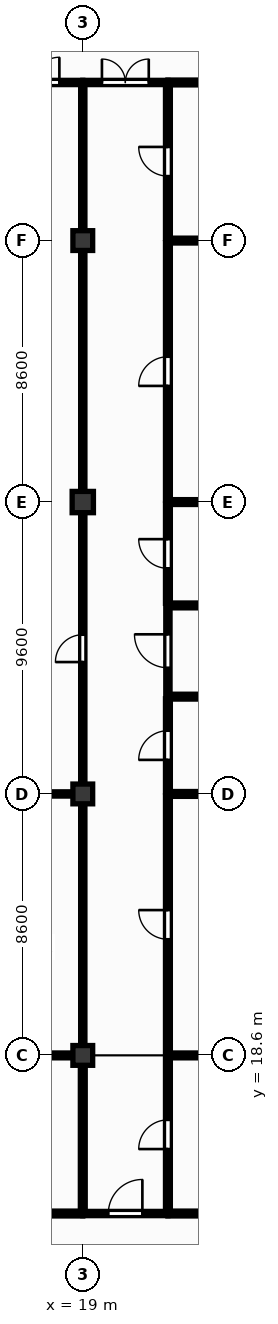
"""IFC4 building model, lengths in metres.
Left out: names, types, materials, properties, quantities, classifications, styles, units other than length and angle.
Written with IfcOpenShell. Run it as: python <this file> out.ifc"""

import sys

from ifc_helpers import new_model, si_unit, direction, frame, frame_2d, origin, origin_2d, place, context, subcontext, project, spatial, rectangle, extrude, element, fill, save


model = new_model("IFC4")
c1 = context("Model", 3, precision=1e-05, world=origin(), true_north=direction((0.0, 1.0)))
c2 = subcontext(c1, "Body", "Model", "MODEL_VIEW")
j1 = project(units=[si_unit("LENGTHUNIT", "METRE"), si_unit("PLANEANGLEUNIT", "RADIAN")], contexts=[c1])
p1 = place(None, origin())
s1 = spatial("IfcSite", under=j1, at=p1, CompositionType="ELEMENT")
p2 = place(p1, origin())
s2 = spatial("IfcBuilding", under=s1, at=p2, CompositionType="ELEMENT")
p3 = place(p2, frame((0.0, 0.0, -4.5)))
s3 = spatial("IfcBuildingStorey", under=s2, at=p3, CompositionType="ELEMENT", Elevation=-4.5)
for number, where, z_axis, x_axis in (
    (1, (19.0, 18.6, 0.0), (0.0, 0.0, 1.0), (1.0, 0.0, 0.0)),
    (2, (19.0, 27.2, 0.0), (0.0, 0.0, 1.0), (1.0, 0.0, 0.0)),
):
    element("IfcColumn", number, at=place(p3, frame(where, z_axis=z_axis, x_axis=x_axis)), inside=s3, PredefinedType="COLUMN", context=c2, shape_type="SweptSolid", body=[
        extrude(rectangle(XDim=0.65, YDim=0.65, at=origin_2d()), origin(), (0.0, 0.0, 1.0), 4.2),
    ])
p4 = place(p3, frame((19.0, 36.8, 0.0), z_axis=(0.0, 0.0, 1.0), x_axis=(1.0, 0.0, 0.0)))
e3 = element("IfcColumn", 3, at=p4, inside=s3, PredefinedType="COLUMN", context=c2, shape_type="SweptSolid", body=[
    extrude(rectangle(XDim=0.7, YDim=0.7, at=origin_2d()), origin(), (0.0, 0.0, 1.0), 4.2),
])
p5 = place(p3, frame((19.0, 45.4, 0.0), z_axis=(0.0, 0.0, 1.0), x_axis=(1.0, 0.0, 0.0)))
e4 = element("IfcColumn", 4, at=p5, inside=s3, PredefinedType="COLUMN", context=c2, shape_type="SweptSolid", body=[
    extrude(rectangle(XDim=0.65, YDim=0.65, at=origin_2d()), origin(), (0.0, 0.0, 1.0), 4.2),
])
p6 = place(p3, frame((14.313, 13.4, 0.0), z_axis=(0.0, 0.0, 1.0), x_axis=(1.0, 0.0, 0.0)))
e5 = element("IfcWall", 5, at=p6, inside=s3, PredefinedType="PARTITIONING", context=c2, shape_type="SweptSolid", body=[
    extrude(rectangle(XDim=4.687, YDim=0.16, at=frame_2d((2.344, 0.0))), origin(), (0.0, 0.0, 1.0), 4.08),
])
p7 = place(p6, frame((1.864, 0.0, 0.0)))
e6 = element("IfcOpeningElement", 6, at=p7, cuts=e5, PredefinedType="OPENING", context=c2, shape_type="SweptSolid", body=[
    extrude(rectangle(XDim=0.96, YDim=2.1, at=frame_2d((0.48, 1.05))), frame((0.0, 0.09, 0.0), z_axis=(0.0, -1.0, 0.0), x_axis=(1.0, 0.0, 0.0)), (0.0, 0.0, 1.0), 0.18),
])
p8 = place(p3, frame((14.313, 18.6, 0.0), z_axis=(0.0, 0.0, 1.0), x_axis=(1.0, 0.0, 0.0)))
e7 = element("IfcWall", 7, at=p8, inside=s3, PredefinedType="PARTITIONING", context=c2, shape_type="SweptSolid", body=[
    extrude(rectangle(XDim=4.362, YDim=0.16, at=frame_2d((2.181, 0.0))), origin(), (0.0, 0.0, 1.0), 3.5),
])
p9 = place(p3, frame((15.8, 27.2, 0.0), z_axis=(0.0, 0.0, 1.0), x_axis=(1.0, 0.0, 0.0)))
e8 = element("IfcWall", 8, at=p9, inside=s3, PredefinedType="PARTITIONING", context=c2, shape_type="SweptSolid", body=[
    extrude(rectangle(XDim=2.875, YDim=0.14, at=frame_2d((1.438, 0.0))), origin(), (0.0, 0.0, 1.0), 3.6),
])
p10 = place(p9, frame((0.798, 0.0, 0.0)))
e9 = element("IfcOpeningElement", 9, at=p10, cuts=e8, PredefinedType="OPENING", context=c2, shape_type="SweptSolid", body=[
    extrude(rectangle(XDim=1.28, YDim=2.2, at=frame_2d((0.64, 1.1))), frame((0.0, 0.08, 0.0), z_axis=(0.0, -1.0, 0.0), x_axis=(1.0, 0.0, 0.0)), (0.0, 0.0, 1.0), 0.16),
])
p11 = place(p3, frame((15.8, 50.6, 0.0), z_axis=(0.0, 0.0, 1.0), x_axis=(1.0, 0.0, 0.0)))
e10 = element("IfcWall", 10, at=p11, inside=s3, PredefinedType="PARTITIONING", context=c2, shape_type="SweptSolid", body=[
    extrude(rectangle(XDim=3.2, YDim=0.14, at=frame_2d((1.6, 0.0))), origin(), (0.0, 0.0, 1.0), 4.08),
])
p12 = place(p11, frame((0.77, 0.0, 0.0)))
e11 = element("IfcOpeningElement", 11, at=p12, cuts=e10, PredefinedType="OPENING", context=c2, shape_type="SweptSolid", body=[
    extrude(rectangle(XDim=1.66, YDim=2.3, at=frame_2d((0.83, 1.15))), frame((0.0, 0.08, 0.0), z_axis=(0.0, -1.0, 0.0), x_axis=(1.0, 0.0, 0.0)), (0.0, 0.0, 1.0), 0.16),
])
p13 = place(p3, frame((19.0, 13.47, 0.0), z_axis=(0.0, 0.0, 1.0), x_axis=(0.0, 1.0, 0.0)))
e12 = element("IfcWall", 12, at=p13, inside=s3, PredefinedType="PARTITIONING", context=c2, shape_type="SweptSolid", body=[
    extrude(rectangle(XDim=4.805, YDim=0.16, at=frame_2d((2.402, 0.0))), origin(), (0.0, 0.0, 1.0), 3.5),
])
p14 = place(p3, frame((19.0, 13.4, 0.0), z_axis=(0.0, 0.0, 1.0), x_axis=(1.0, 0.0, 0.0)))
e13 = element("IfcWall", 13, at=p14, inside=s3, PredefinedType="PARTITIONING", context=c2, shape_type="SweptSolid", body=[
    extrude(rectangle(XDim=2.8, YDim=0.14, at=frame_2d((1.4, 0.0))), origin(), (0.0, 0.0, 1.0), 4.08),
])
p15 = place(p14, frame((0.84, 0.0, 0.0)))
e14 = element("IfcOpeningElement", 14, at=p15, cuts=e13, PredefinedType="OPENING", context=c2, shape_type="SweptSolid", body=[
    extrude(rectangle(XDim=1.12, YDim=2.15, at=frame_2d((0.56, 1.075))), frame((0.0, 0.08, 0.0), z_axis=(0.0, -1.0, 0.0), x_axis=(1.0, 0.0, 0.0)), (0.0, 0.0, 1.0), 0.16),
])
p16 = place(p3, frame((19.0, 18.925, 0.0), z_axis=(0.0, 0.0, 1.0), x_axis=(0.0, 1.0, 0.0)))
e15 = element("IfcWall", 15, at=p16, inside=s3, PredefinedType="PARTITIONING", context=c2, shape_type="SweptSolid", body=[
    extrude(rectangle(XDim=7.95, YDim=0.14, at=frame_2d((3.975, 0.0))), origin(), (0.0, 0.0, 1.0), 3.5),
])
p17 = place(p3, frame((19.0, 27.525, 0.0), z_axis=(0.0, 0.0, 1.0), x_axis=(0.0, 1.0, 0.0)))
e16 = element("IfcWall", 16, at=p17, inside=s3, PredefinedType="PARTITIONING", context=c2, shape_type="SweptSolid", body=[
    extrude(rectangle(XDim=8.925, YDim=0.14, at=frame_2d((4.462, 0.0))), origin(), (0.0, 0.0, 1.0), 3.4),
])
p18 = place(p17, frame((4.012, 0.0, 0.0)))
e17 = element("IfcOpeningElement", 17, at=p18, cuts=e16, PredefinedType="OPENING", context=c2, shape_type="SweptSolid", body=[
    extrude(rectangle(XDim=0.9, YDim=2.1, at=frame_2d((0.45, 1.05))), frame((0.0, 0.08, 0.0), z_axis=(0.0, -1.0, 0.0), x_axis=(1.0, 0.0, 0.0)), (0.0, 0.0, 1.0), 0.16),
])
p19 = place(p3, frame((19.0, 37.15, 0.0), z_axis=(0.0, 0.0, 1.0), x_axis=(0.0, 1.0, 0.0)))
e18 = element("IfcWall", 18, at=p19, inside=s3, PredefinedType="PARTITIONING", context=c2, shape_type="SweptSolid", body=[
    extrude(rectangle(XDim=7.925, YDim=0.14, at=frame_2d((3.962, 0.0))), origin(), (0.0, 0.0, 1.0), 3.5),
])
p20 = place(p3, frame((19.0, 45.725, 0.0), z_axis=(0.0, 0.0, 1.0), x_axis=(0.0, 1.0, 0.0)))
e19 = element("IfcWall", 19, at=p20, inside=s3, PredefinedType="PARTITIONING", context=c2, shape_type="SweptSolid", body=[
    extrude(rectangle(XDim=4.805, YDim=0.14, at=frame_2d((2.402, 0.0))), origin(), (0.0, 0.0, 1.0), 3.5),
])
p21 = place(p3, frame((19.0, 50.6, 0.0), z_axis=(0.0, 0.0, 1.0), x_axis=(1.0, 0.0, 0.0)))
e20 = element("IfcWall", 20, at=p21, inside=s3, PredefinedType="PARTITIONING", context=c2, shape_type="SweptSolid", body=[
    extrude(rectangle(XDim=2.8, YDim=0.14, at=frame_2d((1.4, 0.0))), origin(), (0.0, 0.0, 1.0), 4.08),
])
p22 = place(p21, frame((0.63, 0.0, 0.0)))
e21 = element("IfcOpeningElement", 21, at=p22, cuts=e20, PredefinedType="OPENING", context=c2, shape_type="SweptSolid", body=[
    extrude(rectangle(XDim=1.54, YDim=2.25, at=frame_2d((0.77, 1.125))), frame((0.0, 0.08, 0.0), z_axis=(0.0, -1.0, 0.0), x_axis=(1.0, 0.0, 0.0)), (0.0, 0.0, 1.0), 0.16),
])
p23 = place(p3, frame((21.8, 13.47, 0.0), z_axis=(0.0, 0.0, 1.0), x_axis=(0.0, 1.0, 0.0)))
e22 = element("IfcWall", 22, at=p23, inside=s3, PredefinedType="PARTITIONING", context=c2, shape_type="SweptSolid", body=[
    extrude(rectangle(XDim=5.06, YDim=0.16, at=frame_2d((2.53, 0.0))), origin(), (0.0, 0.0, 1.0), 4.08),
])
p24 = place(p23, frame((2.05, 0.0, 0.0)))
e23 = element("IfcOpeningElement", 23, at=p24, cuts=e22, PredefinedType="OPENING", context=c2, shape_type="SweptSolid", body=[
    extrude(rectangle(XDim=0.96, YDim=2.1, at=frame_2d((0.48, 1.05))), frame((0.0, 0.09, 0.0), z_axis=(0.0, -1.0, 0.0), x_axis=(1.0, 0.0, 0.0)), (0.0, 0.0, 1.0), 0.18),
])
p25 = place(p3, frame((21.8, 13.4, 0.0), z_axis=(0.0, 0.0, 1.0), x_axis=(1.0, 0.0, 0.0)))
e24 = element("IfcWall", 24, at=p25, inside=s3, PredefinedType="PARTITIONING", context=c2, shape_type="SweptSolid", body=[
    extrude(rectangle(XDim=4.4, YDim=0.16, at=frame_2d((2.2, 0.0))), origin(), (0.0, 0.0, 1.0), 4.08),
])
p26 = place(p3, frame((21.8, 18.67, 0.0), z_axis=(0.0, 0.0, 1.0), x_axis=(0.0, 1.0, 0.0)))
e25 = element("IfcWall", 25, at=p26, inside=s3, PredefinedType="PARTITIONING", context=c2, shape_type="SweptSolid", body=[
    extrude(rectangle(XDim=8.46, YDim=0.16, at=frame_2d((4.23, 0.0))), origin(), (0.0, 0.0, 1.0), 4.08),
])
p27 = place(p26, frame((3.75, 0.0, 0.0)))
e26 = element("IfcOpeningElement", 26, at=p27, cuts=e25, PredefinedType="OPENING", context=c2, shape_type="SweptSolid", body=[
    extrude(rectangle(XDim=0.96, YDim=2.1, at=frame_2d((0.48, 1.05))), frame((0.0, 0.09, 0.0), z_axis=(0.0, -1.0, 0.0), x_axis=(1.0, 0.0, 0.0)), (0.0, 0.0, 1.0), 0.18),
])
p28 = place(p3, frame((21.8, 18.6, 0.0), z_axis=(0.0, 0.0, 1.0), x_axis=(1.0, 0.0, 0.0)))
e27 = element("IfcWall", 27, at=p28, inside=s3, PredefinedType="PARTITIONING", context=c2, shape_type="SweptSolid", body=[
    extrude(rectangle(XDim=4.125, YDim=0.16, at=frame_2d((2.062, 0.0))), origin(), (0.0, 0.0, 1.0), 3.5),
])
p29 = place(p3, frame((21.8, 27.27, 0.0), z_axis=(0.0, 0.0, 1.0), x_axis=(0.0, 1.0, 0.0)))
e28 = element("IfcWall", 28, at=p29, inside=s3, PredefinedType="PARTITIONING", context=c2, shape_type="SweptSolid", body=[
    extrude(rectangle(XDim=3.06, YDim=0.16, at=frame_2d((1.53, 0.0))), origin(), (0.0, 0.0, 1.0), 4.08),
])
p30 = place(p29, frame((1.05, 0.0, 0.0)))
e29 = element("IfcOpeningElement", 29, at=p30, cuts=e28, PredefinedType="OPENING", context=c2, shape_type="SweptSolid", body=[
    extrude(rectangle(XDim=0.96, YDim=2.1, at=frame_2d((0.48, 1.05))), frame((0.0, 0.09, 0.0), z_axis=(0.0, -1.0, 0.0), x_axis=(1.0, 0.0, 0.0)), (0.0, 0.0, 1.0), 0.18),
])
p31 = place(p3, frame((21.8, 27.2, 0.0), z_axis=(0.0, 0.0, 1.0), x_axis=(1.0, 0.0, 0.0)))
e30 = element("IfcWall", 30, at=p31, inside=s3, PredefinedType="PARTITIONING", context=c2, shape_type="SweptSolid", body=[
    extrude(rectangle(XDim=4.05, YDim=0.16, at=frame_2d((2.025, 0.0))), origin(), (0.0, 0.0, 1.0), 3.6),
])
p32 = place(p3, frame((21.8, 30.47, 0.0), z_axis=(0.0, 0.0, 1.0), x_axis=(0.0, 1.0, 0.0)))
e31 = element("IfcWall", 31, at=p32, inside=s3, PredefinedType="PARTITIONING", context=c2, shape_type="SweptSolid", body=[
    extrude(rectangle(XDim=2.86, YDim=0.14, at=frame_2d((1.43, 0.0))), origin(), (0.0, 0.0, 1.0), 4.08),
])
p33 = place(p32, frame((0.88, 0.0, 0.0)))
e32 = element("IfcOpeningElement", 32, at=p33, cuts=e31, PredefinedType="OPENING", context=c2, shape_type="SweptSolid", body=[
    extrude(rectangle(XDim=1.1, YDim=2.1, at=frame_2d((0.55, 1.05))), frame((0.0, 0.08, 0.0), z_axis=(0.0, -1.0, 0.0), x_axis=(1.0, 0.0, 0.0)), (0.0, 0.0, 1.0), 0.16),
])
p34 = place(p3, frame((21.8, 30.4, 0.0), z_axis=(0.0, 0.0, 1.0), x_axis=(1.0, 0.0, 0.0)))
e33 = element("IfcWall", 33, at=p34, inside=s3, PredefinedType="PARTITIONING", context=c2, shape_type="SweptSolid", body=[
    extrude(rectangle(XDim=4.4, YDim=0.16, at=frame_2d((2.2, 0.0))), origin(), (0.0, 0.0, 1.0), 4.08),
])
p35 = place(p3, frame((21.8, 33.47, 0.0), z_axis=(0.0, 0.0, 1.0), x_axis=(0.0, 1.0, 0.0)))
e34 = element("IfcWall", 34, at=p35, inside=s3, PredefinedType="PARTITIONING", context=c2, shape_type="SweptSolid", body=[
    extrude(rectangle(XDim=3.26, YDim=0.16, at=frame_2d((1.63, 0.0))), origin(), (0.0, 0.0, 1.0), 4.08),
])
p36 = place(p35, frame((1.15, 0.0, 0.0)))
e35 = element("IfcOpeningElement", 35, at=p36, cuts=e34, PredefinedType="OPENING", context=c2, shape_type="SweptSolid", body=[
    extrude(rectangle(XDim=0.96, YDim=2.1, at=frame_2d((0.48, 1.05))), frame((0.0, 0.09, 0.0), z_axis=(0.0, -1.0, 0.0), x_axis=(1.0, 0.0, 0.0)), (0.0, 0.0, 1.0), 0.18),
])
p37 = place(p3, frame((21.8, 33.4, 0.0), z_axis=(0.0, 0.0, 1.0), x_axis=(1.0, 0.0, 0.0)))
e36 = element("IfcWall", 36, at=p37, inside=s3, PredefinedType="PARTITIONING", context=c2, shape_type="SweptSolid", body=[
    extrude(rectangle(XDim=4.4, YDim=0.16, at=frame_2d((2.2, 0.0))), origin(), (0.0, 0.0, 1.0), 4.08),
])
p38 = place(p3, frame((21.8, 36.87, 0.0), z_axis=(0.0, 0.0, 1.0), x_axis=(0.0, 1.0, 0.0)))
e37 = element("IfcWall", 37, at=p38, inside=s3, PredefinedType="PARTITIONING", context=c2, shape_type="SweptSolid", body=[
    extrude(rectangle(XDim=8.46, YDim=0.16, at=frame_2d((4.23, 0.0))), origin(), (0.0, 0.0, 1.0), 4.08),
])
p39 = place(p38, frame((3.75, 0.0, 0.0)))
e38 = element("IfcOpeningElement", 38, at=p39, cuts=e37, PredefinedType="OPENING", context=c2, shape_type="SweptSolid", body=[
    extrude(rectangle(XDim=0.96, YDim=2.1, at=frame_2d((0.48, 1.05))), frame((0.0, 0.09, 0.0), z_axis=(0.0, -1.0, 0.0), x_axis=(1.0, 0.0, 0.0)), (0.0, 0.0, 1.0), 0.18),
])
p40 = place(p3, frame((21.8, 36.8, 0.0), z_axis=(0.0, 0.0, 1.0), x_axis=(1.0, 0.0, 0.0)))
e39 = element("IfcWall", 39, at=p40, inside=s3, PredefinedType="PARTITIONING", context=c2, shape_type="SweptSolid", body=[
    extrude(rectangle(XDim=4.125, YDim=0.16, at=frame_2d((2.062, 0.0))), origin(), (0.0, 0.0, 1.0), 3.5),
])
p41 = place(p3, frame((21.8, 45.47, 0.0), z_axis=(0.0, 0.0, 1.0), x_axis=(0.0, 1.0, 0.0)))
e40 = element("IfcWall", 40, at=p41, inside=s3, PredefinedType="PARTITIONING", context=c2, shape_type="SweptSolid", body=[
    extrude(rectangle(XDim=5.06, YDim=0.16, at=frame_2d((2.53, 0.0))), origin(), (0.0, 0.0, 1.0), 4.08),
])
p42 = place(p41, frame((2.05, 0.0, 0.0)))
e41 = element("IfcOpeningElement", 41, at=p42, cuts=e40, PredefinedType="OPENING", context=c2, shape_type="SweptSolid", body=[
    extrude(rectangle(XDim=0.96, YDim=2.1, at=frame_2d((0.48, 1.05))), frame((0.0, 0.09, 0.0), z_axis=(0.0, -1.0, 0.0), x_axis=(1.0, 0.0, 0.0)), (0.0, 0.0, 1.0), 0.18),
])
p43 = place(p3, frame((21.8, 45.4, 0.0), z_axis=(0.0, 0.0, 1.0), x_axis=(1.0, 0.0, 0.0)))
e42 = element("IfcWall", 42, at=p43, inside=s3, PredefinedType="PARTITIONING", context=c2, shape_type="SweptSolid", body=[
    extrude(rectangle(XDim=4.125, YDim=0.16, at=frame_2d((2.062, 0.0))), origin(), (0.0, 0.0, 1.0), 3.6),
])
p44 = place(p3, frame((21.8, 50.6, 0.0), z_axis=(0.0, 0.0, 1.0), x_axis=(1.0, 0.0, 0.0)))
e43 = element("IfcWall", 43, at=p44, inside=s3, PredefinedType="PARTITIONING", context=c2, shape_type="SweptSolid", body=[
    extrude(rectangle(XDim=4.4, YDim=0.16, at=frame_2d((2.2, 0.0))), origin(), (0.0, 0.0, 1.0), 4.08),
])
p45 = place(p12, origin())
e44 = element("IfcDoor", 44, at=p45, inside=s3, OperationType="DOUBLE_DOOR_SINGLE_SWING", PredefinedType="DOOR", context=c2, shape_type="SweptSolid", body=[
    extrude(rectangle(XDim=1.66, YDim=2.3, at=frame_2d((0.83, 1.15))), frame((0.0, 0.025, 0.0), z_axis=(0.0, -1.0, 0.0), x_axis=(1.0, 0.0, 0.0)), (0.0, 0.0, 1.0), 0.05),
])
fill(e11, e44)
p46 = place(p22, origin())
e45 = element("IfcDoor", 45, at=p46, inside=s3, OperationType="DOUBLE_DOOR_SINGLE_SWING", PredefinedType="DOOR", context=c2, shape_type="SweptSolid", body=[
    extrude(rectangle(XDim=1.54, YDim=2.25, at=frame_2d((0.77, 1.125))), frame((0.0, 0.025, 0.0), z_axis=(0.0, -1.0, 0.0), x_axis=(1.0, 0.0, 0.0)), (0.0, 0.0, 1.0), 0.05),
])
fill(e21, e45)
p47 = place(p18, origin())
e46 = element("IfcDoor", 46, at=p47, inside=s3, OperationType="SINGLE_SWING_LEFT", PredefinedType="DOOR", context=c2, shape_type="SweptSolid", body=[
    extrude(rectangle(XDim=0.9, YDim=2.1, at=frame_2d((0.45, 1.05))), frame((0.0, 0.025, 0.0), z_axis=(0.0, -1.0, 0.0), x_axis=(1.0, 0.0, 0.0)), (0.0, 0.0, 1.0), 0.05),
])
fill(e17, e46)
p48 = place(p15, origin())
e47 = element("IfcDoor", 47, at=p48, inside=s3, OperationType="SINGLE_SWING_RIGHT", PredefinedType="DOOR", context=c2, shape_type="SweptSolid", body=[
    extrude(rectangle(XDim=1.12, YDim=2.15, at=frame_2d((0.56, 1.075))), frame((0.0, 0.025, 0.0), z_axis=(0.0, -1.0, 0.0), x_axis=(1.0, 0.0, 0.0)), (0.0, 0.0, 1.0), 0.05),
])
fill(e14, e47)
p49 = place(p33, origin())
e48 = element("IfcDoor", 48, at=p49, inside=s3, OperationType="SINGLE_SWING_RIGHT", PredefinedType="DOOR", context=c2, shape_type="SweptSolid", body=[
    extrude(rectangle(XDim=1.1, YDim=2.1, at=frame_2d((0.55, 1.05))), frame((0.0, 0.025, 0.0), z_axis=(0.0, -1.0, 0.0), x_axis=(1.0, 0.0, 0.0)), (0.0, 0.0, 1.0), 0.05),
])
fill(e32, e48)
p50 = place(p27, origin())
e49 = element("IfcDoor", 49, at=p50, inside=s3, OperationType="SINGLE_SWING_RIGHT", PredefinedType="DOOR", context=c2, shape_type="SweptSolid", body=[
    extrude(rectangle(XDim=0.96, YDim=2.1, at=frame_2d((0.48, 1.05))), frame((0.0, 0.025, 0.0), z_axis=(0.0, -1.0, 0.0), x_axis=(1.0, 0.0, 0.0)), (0.0, 0.0, 1.0), 0.05),
])
fill(e26, e49)
p51 = place(p30, origin())
e50 = element("IfcDoor", 50, at=p51, inside=s3, OperationType="SINGLE_SWING_LEFT", PredefinedType="DOOR", context=c2, shape_type="SweptSolid", body=[
    extrude(rectangle(XDim=0.96, YDim=2.1, at=frame_2d((0.48, 1.05))), frame((0.0, 0.025, 0.0), z_axis=(0.0, -1.0, 0.0), x_axis=(1.0, 0.0, 0.0)), (0.0, 0.0, 1.0), 0.05),
])
fill(e29, e50)
p52 = place(p36, origin())
e51 = element("IfcDoor", 51, at=p52, inside=s3, OperationType="SINGLE_SWING_RIGHT", PredefinedType="DOOR", context=c2, shape_type="SweptSolid", body=[
    extrude(rectangle(XDim=0.96, YDim=2.1, at=frame_2d((0.48, 1.05))), frame((0.0, 0.025, 0.0), z_axis=(0.0, -1.0, 0.0), x_axis=(1.0, 0.0, 0.0)), (0.0, 0.0, 1.0), 0.05),
])
fill(e35, e51)
p53 = place(p39, origin())
e52 = element("IfcDoor", 52, at=p53, inside=s3, OperationType="SINGLE_SWING_LEFT", PredefinedType="DOOR", context=c2, shape_type="SweptSolid", body=[
    extrude(rectangle(XDim=0.96, YDim=2.1, at=frame_2d((0.48, 1.05))), frame((0.0, 0.025, 0.0), z_axis=(0.0, -1.0, 0.0), x_axis=(1.0, 0.0, 0.0)), (0.0, 0.0, 1.0), 0.05),
])
fill(e38, e52)
p54 = place(p42, origin())
e53 = element("IfcDoor", 53, at=p54, inside=s3, OperationType="SINGLE_SWING_RIGHT", PredefinedType="DOOR", context=c2, shape_type="SweptSolid", body=[
    extrude(rectangle(XDim=0.96, YDim=2.1, at=frame_2d((0.48, 1.05))), frame((0.0, 0.025, 0.0), z_axis=(0.0, -1.0, 0.0), x_axis=(1.0, 0.0, 0.0)), (0.0, 0.0, 1.0), 0.05),
])
fill(e41, e53)
p55 = place(p24, origin())
e54 = element("IfcDoor", 54, at=p55, inside=s3, OperationType="SINGLE_SWING_LEFT", PredefinedType="DOOR", context=c2, shape_type="SweptSolid", body=[
    extrude(rectangle(XDim=0.96, YDim=2.1, at=frame_2d((0.48, 1.05))), frame((0.0, 0.025, 0.0), z_axis=(0.0, -1.0, 0.0), x_axis=(1.0, 0.0, 0.0)), (0.0, 0.0, 1.0), 0.05),
])
fill(e23, e54)
save(model, sys.argv[1])
